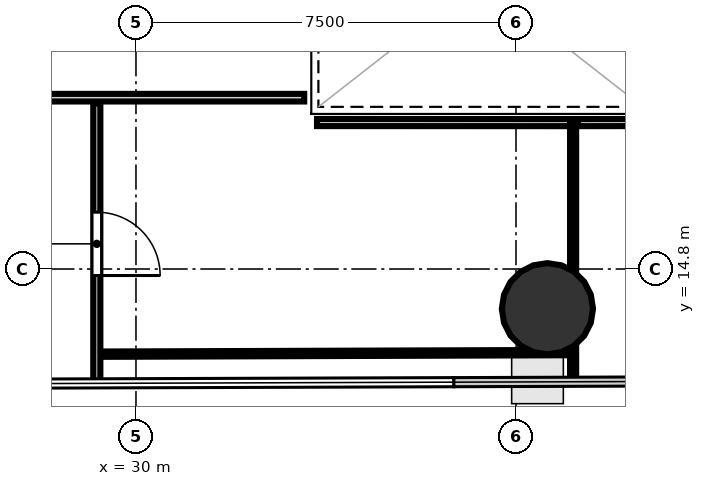
"""IFC4 building model, lengths in metres.
Left out: names, types, materials, properties, quantities, classifications, styles, units other than length and angle.
Written with IfcOpenShell. Run it as: python <this file> out.ifc"""

import sys

from ifc_helpers import new_model, si_unit, direction, frame, frame_2d, origin, origin_2d, place, context, subcontext, project, spatial, rectangle, hollow_circle, extrude, element, fill, save


model = new_model("IFC4")
c1 = context("Model", 3, precision=1e-05, world=origin(), true_north=direction((0.0, 1.0)))
c2 = subcontext(c1, "Body", "Model", "MODEL_VIEW")
j1 = project(units=[si_unit("LENGTHUNIT", "METRE"), si_unit("PLANEANGLEUNIT", "RADIAN")], contexts=[c1])
p1 = place(None, origin())
s1 = spatial("IfcSite", under=j1, at=p1, CompositionType="ELEMENT")
p2 = place(p1, origin())
s2 = spatial("IfcBuilding", under=s1, at=p2, CompositionType="ELEMENT")
p3 = place(p2, frame((0.0, 0.0, 40.5)))
s3 = spatial("IfcBuildingStorey", under=s2, at=p3, CompositionType="ELEMENT", Elevation=40.5)
p4 = place(p3, frame((38.12, 14.016, 0.0), z_axis=(0.0, 0.0, 1.0), x_axis=(1.0, 0.0, 0.0)))
e1 = element("IfcColumn", 1, at=p4, inside=s3, PredefinedType="COLUMN", context=c2, shape_type="SweptSolid", body=[
    extrude(hollow_circle(Radius=0.9, WallThickness=0.045, at=origin_2d()), origin(), (0.0, 0.0, 1.0), 3.7),
])
p5 = place(p3, frame((33.32, 18.181, 0.0), z_axis=(0.0, 0.0, 1.0), x_axis=(-1.0, 0.0, 0.0)))
e2 = element("IfcWall", 2, at=p5, inside=s3, PredefinedType="PARTITIONING", context=c2, shape_type="SweptSolid", body=[
    extrude(rectangle(XDim=9.77, YDim=0.15, at=frame_2d((4.885, 0.0))), origin(), (0.0, 0.0, 1.0), 2.798),
])
p6 = place(p3, frame((29.227, 18.07, 0.0), z_axis=(0.0, 0.0, 1.0), x_axis=(0.0, -1.0, 0.0)))
e3 = element("IfcWall", 3, at=p6, inside=s3, PredefinedType="PARTITIONING", context=c2, shape_type="SweptSolid", body=[
    extrude(rectangle(XDim=5.547, YDim=0.14, at=frame_2d((2.773, 0.0))), origin(), (0.0, 0.0, 1.0), 2.798),
])
p7 = place(p6, frame((2.148, 0.0, 0.0)))
e4 = element("IfcOpeningElement", 4, at=p7, cuts=e3, PredefinedType="OPENING", context=c2, shape_type="SweptSolid", body=[
    extrude(rectangle(XDim=1.25, YDim=2.2, at=frame_2d((0.625, 1.1))), frame((0.0, 0.08, 0.0), z_axis=(0.0, -1.0, 0.0), x_axis=(1.0, 0.0, 0.0)), (0.0, 0.0, 1.0), 0.16),
])
p8 = place(p3, frame((33.573, 17.69, 0.0), z_axis=(0.0, 0.0, 1.0), x_axis=(0.999999971191, -0.000240038399, 0.0)))
e5 = element("IfcWall", 5, at=p8, inside=s3, PredefinedType="PARTITIONING", context=c2, shape_type="SweptSolid", body=[
    extrude(rectangle(XDim=5.085, YDim=0.14, at=frame_2d((2.543, 0.0))), origin(), (0.0, 0.0, 1.0), 2.84),
])
p9 = place(p3, frame((38.627, 17.72, 0.0), z_axis=(0.0, 0.0, 1.0), x_axis=(0.0, -1.0, 0.0)))
e6 = element("IfcWall", 6, at=p9, inside=s3, PredefinedType="PARTITIONING", context=c2, shape_type="SweptSolid", body=[
    extrude(rectangle(XDim=5.165, YDim=0.12, at=frame_2d((2.583, 0.0))), origin(), (0.0, 0.0, 1.0), 2.798),
])
p10 = place(p3, frame((38.658, 13.151, 0.0), z_axis=(0.0, 0.0, 1.0), x_axis=(-0.999994285849, -0.003380572417, 0.0)))
e7 = element("IfcWall", 7, at=p10, inside=s3, PredefinedType="PARTITIONING", context=c2, shape_type="SweptSolid", body=[
    extrude(rectangle(XDim=9.316, YDim=0.105, at=frame_2d((4.658, 0.0))), origin(), (0.0, 0.0, 1.0), 2.798),
])
p11 = place(p3, frame((38.72, 17.689, 0.0), z_axis=(0.0, 0.0, 1.0), x_axis=(0.999999721126, 0.000746825781, 0.0)))
e8 = element("IfcWall", 8, at=p11, inside=s3, PredefinedType="PARTITIONING", context=c2, shape_type="SweptSolid", body=[
    extrude(rectangle(XDim=1.308, YDim=0.14, at=frame_2d((0.654, 0.0))), origin(), (0.0, 0.0, 1.0), 2.84),
])
p12 = place(p7, origin())
e9 = element("IfcDoor", 9, at=p12, inside=s3, OperationType="SINGLE_SWING_RIGHT", PredefinedType="DOOR", context=c2, shape_type="SweptSolid", body=[
    extrude(rectangle(XDim=1.25, YDim=2.2, at=frame_2d((0.625, 1.1))), frame((0.0, 0.025, 0.0), z_axis=(0.0, -1.0, 0.0), x_axis=(1.0, 0.0, 0.0)), (0.0, 0.0, 1.0), 0.05),
])
fill(e4, e9)
save(model, sys.argv[1])
